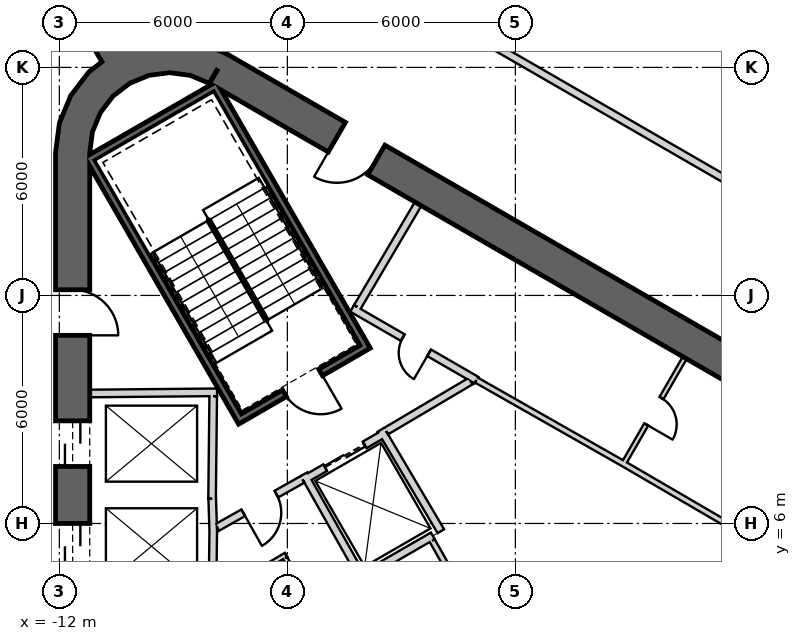
"""IFC4 building model, lengths in metres.
Left out: names, types, materials, properties, quantities, classifications, styles, units other than length and angle.
Written with IfcOpenShell. Run it as: python <this file> out.ifc"""

import sys

from ifc_helpers import new_model, si_unit, direction, frame, frame_2d, origin, place, context, subcontext, project, spatial, polyline, rectangle, outline, extrude, element, fill, save


model = new_model("IFC4")
c1 = context("Model", 3, precision=1e-05, world=origin(), true_north=direction((0.0, 1.0)))
c2 = subcontext(c1, "Body", "Model", "MODEL_VIEW")
j1 = project(units=[si_unit("LENGTHUNIT", "METRE"), si_unit("PLANEANGLEUNIT", "RADIAN")], contexts=[c1])
p1 = place(None, origin())
s1 = spatial("IfcSite", under=j1, at=p1, CompositionType="ELEMENT")
p2 = place(p1, origin())
s2 = spatial("IfcBuilding", under=s1, at=p2, CompositionType="ELEMENT")
p3 = place(p2, frame((0.0, 0.0, 193.2)))
s3 = spatial("IfcBuildingStorey", under=s2, at=p3, CompositionType="ELEMENT", Elevation=193.2)
p4 = place(p3, frame((19.475, 2.208, 0.0), z_axis=(0.0, 0.0, 1.0), x_axis=(-0.866028369851, 0.499994862586, 0.0)))
e1 = element("IfcWall", 1, at=p4, inside=s3, PredefinedType="SHEAR", context=c2, shape_type="SweptSolid", body=[
    extrude(rectangle(XDim=31.523, YDim=0.9, at=frame_2d((15.762, 0.0))), origin(), (0.0, 0.0, 1.0), 4.0),
])
p5 = place(p4, frame((7.062, 0.0, 0.0)))
e2 = element("IfcOpeningElement", 2, at=p5, cuts=e1, PredefinedType="OPENING", context=c2, shape_type="SweptSolid", body=[
    extrude(rectangle(XDim=1.2, YDim=2.4, at=frame_2d((0.6, 1.2))), frame((0.0, 0.46, 0.0), z_axis=(0.0, -1.0, 0.0), x_axis=(1.0, 0.0, 0.0)), (0.0, 0.0, 1.0), 0.92),
])
p6 = place(p4, frame((3.612, 0.0, 0.0)))
e3 = element("IfcOpeningElement", 3, at=p6, cuts=e1, PredefinedType="OPENING", context=c2, shape_type="SweptSolid", body=[
    extrude(rectangle(XDim=1.2, YDim=2.4, at=frame_2d((0.6, 1.2))), frame((0.0, 0.46, 0.0), z_axis=(0.0, -1.0, 0.0), x_axis=(1.0, 0.0, 0.0)), (0.0, 0.0, 1.0), 0.92),
])
p7 = place(p4, frame((26.712, 0.0, 0.0)))
e4 = element("IfcOpeningElement", 4, at=p7, cuts=e1, PredefinedType="OPENING", context=c2, shape_type="SweptSolid", body=[
    extrude(rectangle(XDim=1.2, YDim=2.4, at=frame_2d((0.6, 1.2))), frame((0.0, 0.46, 0.0), z_axis=(0.0, -1.0, 0.0), x_axis=(1.0, 0.0, 0.0)), (0.0, 0.0, 1.0), 0.92),
])
p8 = place(p3, frame((-11.65, 15.762, 0.0), z_axis=(0.0, 0.0, 1.0), x_axis=(0.0, -1.0, 0.0)))
e5 = element("IfcWall", 5, at=p8, inside=s3, PredefinedType="SHEAR", context=c2, shape_type="SweptSolid", body=[
    extrude(rectangle(XDim=31.523, YDim=0.9, at=frame_2d((15.762, 0.0))), origin(), (0.0, 0.0, 1.0), 4.0),
])
p9 = place(p8, frame((7.062, 0.0, 0.0)))
e6 = element("IfcOpeningElement", 6, at=p9, cuts=e5, PredefinedType="OPENING", context=c2, shape_type="SweptSolid", body=[
    extrude(rectangle(XDim=1.2, YDim=2.4, at=frame_2d((0.6, 1.2))), frame((0.0, 0.46, 0.0), z_axis=(0.0, -1.0, 0.0), x_axis=(1.0, 0.0, 0.0)), (0.0, 0.0, 1.0), 0.92),
])
p10 = place(p8, frame((9.762, 0.0, 0.0)))
e7 = element("IfcOpeningElement", 7, at=p10, cuts=e5, PredefinedType="OPENING", context=c2, shape_type="SweptSolid", body=[
    extrude(rectangle(XDim=1.2, YDim=2.4, at=frame_2d((0.6, 1.2))), frame((0.0, 0.46, 0.0), z_axis=(0.0, -1.0, 0.0), x_axis=(1.0, 0.0, 0.0)), (0.0, 0.0, 1.0), 0.92),
])
p11 = place(p8, frame((12.462, 0.0, 0.0)))
e8 = element("IfcOpeningElement", 8, at=p11, cuts=e5, PredefinedType="OPENING", context=c2, shape_type="SweptSolid", body=[
    extrude(rectangle(XDim=1.2, YDim=2.4, at=frame_2d((0.6, 1.2))), frame((0.0, 0.46, 0.0), z_axis=(0.0, -1.0, 0.0), x_axis=(1.0, 0.0, 0.0)), (0.0, 0.0, 1.0), 0.92),
])
p12 = place(p8, frame((15.162, 0.0, 0.0)))
e9 = element("IfcOpeningElement", 9, at=p12, cuts=e5, PredefinedType="OPENING", context=c2, shape_type="SweptSolid", body=[
    extrude(rectangle(XDim=1.2, YDim=2.4, at=frame_2d((0.6, 1.2))), frame((0.0, 0.46, 0.0), z_axis=(0.0, -1.0, 0.0), x_axis=(1.0, 0.0, 0.0)), (0.0, 0.0, 1.0), 0.92),
])
p13 = place(p8, frame((17.862, 0.0, 0.0)))
e10 = element("IfcOpeningElement", 10, at=p13, cuts=e5, PredefinedType="OPENING", context=c2, shape_type="SweptSolid", body=[
    extrude(rectangle(XDim=1.2, YDim=2.4, at=frame_2d((0.6, 1.2))), frame((0.0, 0.46, 0.0), z_axis=(0.0, -1.0, 0.0), x_axis=(1.0, 0.0, 0.0)), (0.0, 0.0, 1.0), 0.92),
])
p14 = place(p8, frame((20.562, 0.0, 0.0)))
e11 = element("IfcOpeningElement", 11, at=p14, cuts=e5, PredefinedType="OPENING", context=c2, shape_type="SweptSolid", body=[
    extrude(rectangle(XDim=1.2, YDim=2.4, at=frame_2d((0.6, 1.2))), frame((0.0, 0.46, 0.0), z_axis=(0.0, -1.0, 0.0), x_axis=(1.0, 0.0, 0.0)), (0.0, 0.0, 1.0), 0.92),
])
p15 = place(p8, frame((23.262, 0.0, 0.0)))
e12 = element("IfcOpeningElement", 12, at=p15, cuts=e5, PredefinedType="OPENING", context=c2, shape_type="SweptSolid", body=[
    extrude(rectangle(XDim=1.2, YDim=2.4, at=frame_2d((0.6, 1.2))), frame((0.0, 0.46, 0.0), z_axis=(0.0, -1.0, 0.0), x_axis=(1.0, 0.0, 0.0)), (0.0, 0.0, 1.0), 0.92),
])
p16 = place(p8, frame((3.612, 0.0, 0.0)))
e13 = element("IfcOpeningElement", 13, at=p16, cuts=e5, PredefinedType="OPENING", context=c2, shape_type="SweptSolid", body=[
    extrude(rectangle(XDim=1.2, YDim=2.4, at=frame_2d((0.6, 1.2))), frame((0.0, 0.46, 0.0), z_axis=(0.0, -1.0, 0.0), x_axis=(1.0, 0.0, 0.0)), (0.0, 0.0, 1.0), 0.92),
])
p17 = place(p8, frame((26.712, 0.0, 0.0)))
e14 = element("IfcOpeningElement", 14, at=p17, cuts=e5, PredefinedType="OPENING", context=c2, shape_type="SweptSolid", body=[
    extrude(rectangle(XDim=1.2, YDim=2.4, at=frame_2d((0.6, 1.2))), frame((0.0, 0.46, 0.0), z_axis=(0.0, -1.0, 0.0), x_axis=(1.0, 0.0, 0.0)), (0.0, 0.0, 1.0), 0.92),
])
p18 = place(p3, origin())
e15 = element("IfcWall", 15, at=p18, inside=s3, PredefinedType="SHEAR", context=c2, shape_type="SweptSolid", body=[
    extrude(outline(polyline([(-7.6, 18.36), (-8.323, 18.659), (-9.1, 18.762), (-9.876, 18.659), (-10.6, 18.36), (-11.221, 17.883), (-11.698, 17.262), (-11.998, 16.538), (-12.1, 15.762), (-11.2, 15.762), (-11.128, 16.305), (-10.919, 16.812), (-10.585, 17.247), (-10.15, 17.58), (-9.644, 17.79), (-9.1, 17.862), (-8.556, 17.79), (-8.05, 17.58), (-7.6, 18.36)])), origin(), (0.0, 0.0, 1.0), 4.0),
])
p19 = place(p3, frame((-10.575, 18.316, 0.0), z_axis=(0.0, 0.0, 1.0), x_axis=(-0.500001138955, 0.866024746207, 0.0)))
e16 = element("IfcWall", 16, at=p19, inside=s3, PredefinedType="SHEAR", context=c2, shape_type="SweptSolid", body=[
    extrude(rectangle(XDim=12.007, YDim=0.7, at=frame_2d((6.003, 0.0))), origin(), (0.0, 0.0, 1.0), 4.0),
])
p20 = place(p3, frame((-11.2, 9.42, 0.0), z_axis=(0.0, 0.0, 1.0), x_axis=(0.999957167047, 0.009255488683, 0.0)))
e17 = element("IfcWall", 17, at=p20, inside=s3, PredefinedType="PLUMBINGWALL", context=c2, shape_type="SweptSolid", body=[
    extrude(rectangle(XDim=3.35, YDim=0.2, at=frame_2d((1.675, 0.0))), origin(), (0.0, 0.0, 1.0), 3.7),
])
p21 = place(p3, frame((-7.951, 9.35, 0.0), z_axis=(0.0, 0.0, 1.0), x_axis=(-0.011120469654, -0.999938165666, 0.0)))
e18 = element("IfcWall", 18, at=p21, inside=s3, PredefinedType="PLUMBINGWALL", context=c2, shape_type="SweptSolid", body=[
    extrude(rectangle(XDim=2.7, YDim=0.2, at=frame_2d((1.35, 0.0))), origin(), (0.0, 0.0, 1.0), 3.7),
])
p22 = place(p3, frame((-7.977, 6.65, 0.0), z_axis=(0.0, 0.0, 1.0), x_axis=(0.030861509705, -0.999523670164, 0.0)))
e19 = element("IfcWall", 19, at=p22, inside=s3, PredefinedType="PLUMBINGWALL", context=c2, shape_type="SweptSolid", body=[
    extrude(rectangle(XDim=0.878, YDim=0.2, at=frame_2d((0.439, 0.0))), origin(), (0.0, 0.0, 1.0), 3.7),
])
p23 = place(p3, frame((-7.949, 5.895, 0.0), z_axis=(0.0, 0.0, 1.0), x_axis=(-0.012042535896, -0.999927486035, 0.0)))
e20 = element("IfcWall", 20, at=p23, inside=s3, PredefinedType="PLUMBINGWALL", context=c2, shape_type="SweptSolid", body=[
    extrude(rectangle(XDim=1.845, YDim=0.2, at=frame_2d((0.922, 0.0))), origin(), (0.0, 0.0, 1.0), 3.7),
])
p24 = place(p3, frame((-11.245, 15.678, -0.3), z_axis=(0.0, 0.0, 1.0), x_axis=(0.499977274689, -0.866038523851, 0.0)))
e21 = element("IfcWall", 21, at=p24, inside=s3, PredefinedType="SHEAR", context=c2, shape_type="SweptSolid", body=[
    extrude(rectangle(XDim=8.1, YDim=0.2, at=frame_2d((4.05, 0.0))), origin(), (0.0, 0.0, 1.0), 4.0),
])
p25 = place(p3, frame((-7.818, 17.541, -0.3), z_axis=(0.0, 0.0, 1.0), x_axis=(-0.866044365799, -0.499967155389, 0.0)))
e22 = element("IfcWall", 22, at=p25, inside=s3, PredefinedType="SHEAR", context=c2, shape_type="SweptSolid", body=[
    extrude(rectangle(XDim=3.8, YDim=0.2, at=frame_2d((1.9, 0.0))), origin(), (0.0, 0.0, 1.0), 4.0),
])
p26 = place(p3, frame((-7.854, 17.405, -0.3), z_axis=(0.0, 0.0, 1.0), x_axis=(0.499997992926, -0.866026562566, 0.0)))
e23 = element("IfcWall", 23, at=p26, inside=s3, PredefinedType="SHEAR", context=c2, shape_type="SweptSolid", body=[
    extrude(rectangle(XDim=7.9, YDim=0.2, at=frame_2d((3.95, 0.0))), origin(), (0.0, 0.0, 1.0), 4.0),
])
p27 = place(p3, frame((-7.159, 8.8, -0.3), z_axis=(0.0, 0.0, 1.0), x_axis=(0.866047807691, 0.499961193289, 0.0)))
e24 = element("IfcWall", 24, at=p27, inside=s3, PredefinedType="SHEAR", context=c2, shape_type="SweptSolid", body=[
    extrude(rectangle(XDim=3.6, YDim=0.2, at=frame_2d((1.8, 0.0))), origin(), (0.0, 0.0, 1.0), 4.0),
])
p28 = place(p27, frame((1.25, 0.0, 0.3)))
e25 = element("IfcOpeningElement", 25, at=p28, cuts=e24, PredefinedType="OPENING", context=c2, shape_type="SweptSolid", body=[
    extrude(rectangle(XDim=1.1, YDim=2.1, at=frame_2d((0.55, 1.05))), frame((0.0, 0.11, 0.0), z_axis=(0.0, -1.0, 0.0), x_axis=(1.0, 0.0, 0.0)), (0.0, 0.0, 1.0), 0.22),
])
p29 = place(p3, frame((-5.524, 7.168, 0.0), z_axis=(0.0, 0.0, 1.0), x_axis=(0.866024647952, 0.500001309137, 0.0)))
e26 = element("IfcWall", 26, at=p29, inside=s3, PredefinedType="PLUMBINGWALL", context=c2, shape_type="SweptSolid", body=[
    extrude(rectangle(XDim=2.4, YDim=0.2, at=frame_2d((1.2, 0.0))), origin(), (0.0, 0.0, 1.0), 3.7),
])
p30 = place(p29, frame((0.6, 0.0, 0.0)))
e27 = element("IfcOpeningElement", 27, at=p30, cuts=e26, PredefinedType="OPENING", context=c2, shape_type="SweptSolid", body=[
    extrude(rectangle(XDim=1.2, YDim=2.4, at=frame_2d((0.6, 1.2))), frame((0.0, 0.11, 0.0), z_axis=(0.0, -1.0, 0.0), x_axis=(1.0, 0.0, 0.0)), (0.0, 0.0, 1.0), 0.22),
])
p31 = place(p3, frame((-3.538, 8.465, 0.0), z_axis=(0.0, 0.0, 1.0), x_axis=(0.508647062354, -0.860975125052, 0.0)))
e28 = element("IfcWall", 28, at=p31, inside=s3, PredefinedType="PLUMBINGWALL", context=c2, shape_type="SweptSolid", body=[
    extrude(rectangle(XDim=3.1, YDim=0.2, at=frame_2d((1.55, 0.0))), origin(), (0.0, 0.0, 1.0), 3.7),
])
p32 = place(p3, frame((-2.173, 5.673, 0.0), z_axis=(0.0, 0.0, 1.0), x_axis=(-0.866028691075, -0.499994306202, 0.0)))
e29 = element("IfcWall", 29, at=p32, inside=s3, PredefinedType="PLUMBINGWALL", context=c2, shape_type="SweptSolid", body=[
    extrude(rectangle(XDim=2.254, YDim=0.2, at=frame_2d((1.127, 0.0))), origin(), (0.0, 0.0, 1.0), 3.7),
])
p33 = place(p3, frame((-5.562, 7.296, 0.0), z_axis=(0.0, 0.0, 1.0), x_axis=(0.49134651263, -0.870964180966, 0.0)))
e30 = element("IfcWall", 30, at=p33, inside=s3, PredefinedType="PLUMBINGWALL", context=c2, shape_type="SweptSolid", body=[
    extrude(rectangle(XDim=3.0, YDim=0.2, at=frame_2d((1.5, 0.0))), origin(), (0.0, 0.0, 1.0), 3.7),
])
p34 = place(p3, frame((4.457, 10.359, 0.0), z_axis=(0.0, 0.0, 1.0), x_axis=(-0.500017246033, -0.866015446554, 0.0)))
e31 = element("IfcWall", 31, at=p34, inside=s3, PredefinedType="PARTITIONING", context=c2, shape_type="SweptSolid", body=[
    extrude(rectangle(XDim=3.25, YDim=0.12, at=frame_2d((1.625, 0.0))), origin(), (0.0, 0.0, 1.0), 3.7),
])
p35 = place(p34, frame((1.225, 0.0, 0.0)))
e32 = element("IfcOpeningElement", 32, at=p35, cuts=e31, PredefinedType="OPENING", context=c2, shape_type="SweptSolid", body=[
    extrude(rectangle(XDim=0.8, YDim=2.1, at=frame_2d((0.4, 1.05))), frame((0.0, 0.07, 0.0), z_axis=(0.0, -1.0, 0.0), x_axis=(1.0, 0.0, 0.0)), (0.0, 0.0, 1.0), 0.14),
])
p36 = place(p3, frame((8.931, 4.024, 0.0), z_axis=(0.0, 0.0, 1.0), x_axis=(-0.863936620311, 0.50360055211, 0.0)))
e33 = element("IfcWall", 33, at=p36, inside=s3, PredefinedType="PLUMBINGWALL", context=c2, shape_type="SweptSolid", body=[
    extrude(rectangle(XDim=7.072, YDim=0.15, at=frame_2d((3.536, 0.0))), origin(), (0.0, 0.0, 1.0), 3.7),
])
p37 = place(p3, frame((-4.296, 11.66, 0.0), z_axis=(0.0, 0.0, 1.0), x_axis=(0.866027389382, -0.499996560828, 0.0)))
e34 = element("IfcWall", 34, at=p37, inside=s3, PredefinedType="PARTITIONING", context=c2, shape_type="SweptSolid", body=[
    extrude(rectangle(XDim=3.778, YDim=0.2, at=frame_2d((1.889, 0.0))), origin(), (0.0, 0.0, 1.0), 3.7),
])
p38 = place(p37, frame((1.539, 0.0, 0.0)))
e35 = element("IfcOpeningElement", 35, at=p38, cuts=e34, PredefinedType="OPENING", context=c2, shape_type="SweptSolid", body=[
    extrude(rectangle(XDim=0.8, YDim=2.1, at=frame_2d((0.4, 1.05))), frame((0.0, 0.11, 0.0), z_axis=(0.0, -1.0, 0.0), x_axis=(1.0, 0.0, 0.0)), (0.0, 0.0, 1.0), 0.22),
])
p39 = place(p3, frame((-2.558, 14.409, 0.0), z_axis=(0.0, 0.0, 1.0), x_axis=(-0.508018930956, -0.861345903683, 0.0)))
e36 = element("IfcWall", 36, at=p39, inside=s3, PredefinedType="PARTITIONING", context=c2, shape_type="SweptSolid", body=[
    extrude(rectangle(XDim=3.15, YDim=0.2, at=frame_2d((1.575, 0.0))), origin(), (0.0, 0.0, 1.0), 3.7),
])
p40 = place(p3, frame((2.821, 7.586, 0.0), z_axis=(0.0, 0.0, 1.0), x_axis=(-0.869355227283, 0.494187706035, 0.0)))
e37 = element("IfcWall", 37, at=p40, inside=s3, PredefinedType="PLUMBINGWALL", context=c2, shape_type="SweptSolid", body=[
    extrude(rectangle(XDim=4.423, YDim=0.15, at=frame_2d((2.211, 0.0))), origin(), (0.0, 0.0, 1.0), 3.7),
])
p41 = place(p3, frame((-1.179, 9.745, 0.0), z_axis=(0.0, 0.0, 1.0), x_axis=(-0.860630814782, -0.509229418482, 0.0)))
e38 = element("IfcWall", 38, at=p41, inside=s3, PredefinedType="PARTITIONING", context=c2, shape_type="SweptSolid", body=[
    extrude(rectangle(XDim=2.582, YDim=0.2, at=frame_2d((1.291, 0.0))), origin(), (0.0, 0.0, 1.0), 3.7),
])
p42 = place(p3, frame((-5.6, 7.16, 0.0), z_axis=(0.0, 0.0, 1.0), x_axis=(-0.871363259478, -0.490638431059, 0.0)))
e39 = element("IfcWall", 39, at=p42, inside=s3, PredefinedType="PARTITIONING", context=c2, shape_type="SweptSolid", body=[
    extrude(rectangle(XDim=2.581, YDim=0.2, at=frame_2d((1.291, 0.0))), origin(), (0.0, 0.0, 1.0), 3.7),
])
p43 = place(p42, frame((0.791, 0.0, 0.0)))
e40 = element("IfcOpeningElement", 40, at=p43, cuts=e39, PredefinedType="OPENING", context=c2, shape_type="SweptSolid", body=[
    extrude(rectangle(XDim=1.0, YDim=2.1, at=frame_2d((0.5, 1.05))), frame((0.0, 0.11, 0.0), z_axis=(0.0, -1.0, 0.0), x_axis=(1.0, 0.0, 0.0)), (0.0, 0.0, 1.0), 0.22),
])
p44 = place(p3, frame((-2.189, 5.549, 0.0), z_axis=(0.0, 0.0, 1.0), x_axis=(0.49303694679, -0.870008373006, 0.0)))
e41 = element("IfcWall", 41, at=p44, inside=s3, PredefinedType="PLUMBINGWALL", context=c2, shape_type="SweptSolid", body=[
    extrude(rectangle(XDim=3.538, YDim=0.15, at=frame_2d((1.769, 0.0))), origin(), (0.0, 0.0, 1.0), 3.7),
])
p45 = place(p3, frame((-6.037, 5.176, 0.0), z_axis=(0.0, 0.0, 1.0), x_axis=(-0.860106072674, -0.510115225953, 0.0)))
e42 = element("IfcWall", 42, at=p45, inside=s3, PredefinedType="PARTITIONING", context=c2, shape_type="SweptSolid", body=[
    extrude(rectangle(XDim=2.225, YDim=0.12, at=frame_2d((1.112, 0.0))), origin(), (0.0, 0.0, 1.0), 3.7),
])
p46 = place(p3, frame((-4.686, 2.657, 0.0), z_axis=(0.0, 0.0, 1.0), x_axis=(-0.491052820648, 0.87112979936, 0.0)))
e43 = element("IfcWall", 43, at=p46, inside=s3, PredefinedType="PARTITIONING", context=c2, shape_type="SweptSolid", body=[
    extrude(rectangle(XDim=2.796, YDim=0.12, at=frame_2d((1.398, 0.0))), origin(), (0.0, 0.0, 1.0), 3.7),
])
p47 = place(p3, frame((9.675, 12.658, 0.0), z_axis=(0.0, 0.0, 1.0), x_axis=(-0.866018456403, 0.500012033024, 0.0)))
e44 = element("IfcWall", 44, at=p47, inside=s3, PredefinedType="PARTITIONING", context=c2, shape_type="SweptSolid", body=[
    extrude(rectangle(XDim=12.285, YDim=0.2, at=frame_2d((6.143, 0.0))), origin(), (0.0, 0.0, 1.0), 2.98),
])
p48 = place(p28, origin())
e45 = element("IfcDoor", 45, at=p48, inside=s3, OperationType="SINGLE_SWING_LEFT", PredefinedType="USERDEFINED", context=c2, shape_type="SweptSolid", body=[
    extrude(rectangle(XDim=1.1, YDim=2.1, at=frame_2d((0.55, 1.05))), frame((0.0, 0.025, 0.0), z_axis=(0.0, -1.0, 0.0), x_axis=(1.0, 0.0, 0.0)), (0.0, 0.0, 1.0), 0.05),
])
fill(e25, e45)
p49 = place(p43, origin())
e46 = element("IfcDoor", 46, at=p49, inside=s3, OperationType="SINGLE_SWING_LEFT", PredefinedType="USERDEFINED", context=c2, shape_type="SweptSolid", body=[
    extrude(rectangle(XDim=1.0, YDim=2.1, at=frame_2d((0.5, 1.05))), frame((0.0, 0.025, 0.0), z_axis=(0.0, -1.0, 0.0), x_axis=(1.0, 0.0, 0.0)), (0.0, 0.0, 1.0), 0.05),
])
fill(e40, e46)
p50 = place(p30, origin())
e47 = element("IfcDoor", 47, at=p50, inside=s3, OperationType="SLIDING_TO_LEFT", PredefinedType="USERDEFINED", context=c2, shape_type="SweptSolid", body=[
    extrude(rectangle(XDim=1.2, YDim=2.4, at=frame_2d((0.6, 1.2))), frame((0.0, 0.025, 0.0), z_axis=(0.0, -1.0, 0.0), x_axis=(1.0, 0.0, 0.0)), (0.0, 0.0, 1.0), 0.05),
])
fill(e27, e47)
p51 = place(p35, origin())
e48 = element("IfcDoor", 48, at=p51, inside=s3, OperationType="SINGLE_SWING_RIGHT", PredefinedType="USERDEFINED", context=c2, shape_type="SweptSolid", body=[
    extrude(rectangle(XDim=0.8, YDim=2.1, at=frame_2d((0.4, 1.05))), frame((0.0, 0.025, 0.0), z_axis=(0.0, -1.0, 0.0), x_axis=(1.0, 0.0, 0.0)), (0.0, 0.0, 1.0), 0.05),
])
fill(e32, e48)
p52 = place(p38, origin())
e49 = element("IfcDoor", 49, at=p52, inside=s3, OperationType="SINGLE_SWING_LEFT", PredefinedType="USERDEFINED", context=c2, shape_type="SweptSolid", body=[
    extrude(rectangle(XDim=0.8, YDim=2.1, at=frame_2d((0.4, 1.05))), frame((0.0, 0.025, 0.0), z_axis=(0.0, -1.0, 0.0), x_axis=(1.0, 0.0, 0.0)), (0.0, 0.0, 1.0), 0.05),
])
fill(e35, e49)
p53 = place(p9, origin())
e50 = element("IfcDoor", 50, at=p53, inside=s3, OperationType="SLIDING_TO_LEFT", PredefinedType="USERDEFINED", context=c2, shape_type="SweptSolid", body=[
    extrude(rectangle(XDim=1.2, YDim=2.4, at=frame_2d((0.6, 1.2))), frame((0.0, 0.025, 0.0), z_axis=(0.0, -1.0, 0.0), x_axis=(1.0, 0.0, 0.0)), (0.0, 0.0, 1.0), 0.05),
])
fill(e6, e50)
p54 = place(p10, origin())
e51 = element("IfcDoor", 51, at=p54, inside=s3, OperationType="SLIDING_TO_LEFT", PredefinedType="USERDEFINED", context=c2, shape_type="SweptSolid", body=[
    extrude(rectangle(XDim=1.2, YDim=2.4, at=frame_2d((0.6, 1.2))), frame((0.0, 0.025, 0.0), z_axis=(0.0, -1.0, 0.0), x_axis=(1.0, 0.0, 0.0)), (0.0, 0.0, 1.0), 0.05),
])
fill(e7, e51)
p55 = place(p7, origin())
e52 = element("IfcDoor", 52, at=p55, inside=s3, OperationType="SINGLE_SWING_RIGHT", PredefinedType="USERDEFINED", context=c2, shape_type="SweptSolid", body=[
    extrude(rectangle(XDim=1.2, YDim=2.4, at=frame_2d((0.6, 1.2))), frame((0.0, 0.025, 0.0), z_axis=(0.0, -1.0, 0.0), x_axis=(1.0, 0.0, 0.0)), (0.0, 0.0, 1.0), 0.05),
])
fill(e4, e52)
p56 = place(p16, origin())
e53 = element("IfcDoor", 53, at=p56, inside=s3, OperationType="SINGLE_SWING_RIGHT", PredefinedType="USERDEFINED", context=c2, shape_type="SweptSolid", body=[
    extrude(rectangle(XDim=1.2, YDim=2.4, at=frame_2d((0.6, 1.2))), frame((0.0, 0.025, 0.0), z_axis=(0.0, -1.0, 0.0), x_axis=(1.0, 0.0, 0.0)), (0.0, 0.0, 1.0), 0.05),
])
fill(e13, e53)
save(model, sys.argv[1])
